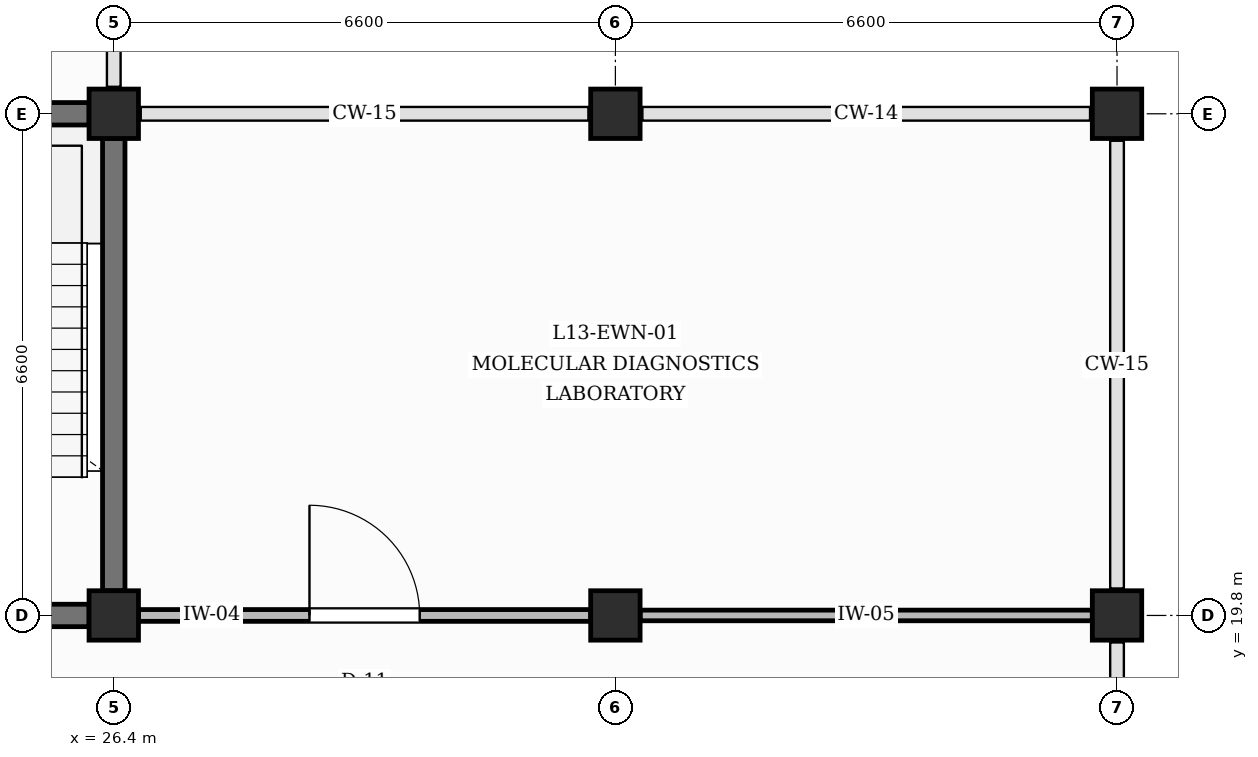
"""IFC4 building model, lengths in metres.
Left out: names, types, materials, properties, quantities, classifications, styles, units other than length and angle.
Written with IfcOpenShell. Run it as: python <this file> out.ifc"""

import sys

from ifc_helpers import new_model, si_unit, direction, frame, frame_2d, origin, origin_2d, place, context, subcontext, project, spatial, rectangle, extrude, element, fill, save


model = new_model("IFC4")
c1 = context("Model", 3, precision=1e-05, world=origin(), true_north=direction((0.0, 1.0)))
c2 = subcontext(c1, "Body", "Model", "MODEL_VIEW")
j1 = project(units=[si_unit("LENGTHUNIT", "METRE"), si_unit("PLANEANGLEUNIT", "RADIAN")], contexts=[c1])
p1 = place(None, origin())
s1 = spatial("IfcSite", under=j1, at=p1, CompositionType="ELEMENT")
p2 = place(p1, origin())
s2 = spatial("IfcBuilding", under=s1, at=p2, CompositionType="ELEMENT")
p3 = place(p2, frame((0.0, 0.0, 56.4)))
s3 = spatial("IfcBuildingStorey", under=s2, at=p3, CompositionType="ELEMENT", Elevation=56.4)
for number, where, z_axis, x_axis in (
    (1, (26.4, 19.8, 0.0), (0.0, 0.0, 1.0), (1.0, 0.0, 0.0)),
    (2, (26.4, 26.4, 0.0), (0.0, 0.0, 1.0), (1.0, 0.0, 0.0)),
    (3, (33.0, 19.8, 0.0), (0.0, 0.0, 1.0), (1.0, 0.0, 0.0)),
    (4, (33.0, 26.4, 0.0), (0.0, 0.0, 1.0), (1.0, 0.0, 0.0)),
    (5, (39.6, 19.8, 0.0), (0.0, 0.0, 1.0), (1.0, 0.0, 0.0)),
    (6, (39.6, 26.4, 0.0), (0.0, 0.0, 1.0), (1.0, 0.0, 0.0)),
):
    element("IfcColumn", number, at=place(p3, frame(where, z_axis=z_axis, x_axis=x_axis)), inside=s3, PredefinedType="COLUMN", context=c2, shape_type="SweptSolid", body=[
        extrude(rectangle(XDim=0.65, YDim=0.65, at=origin_2d()), origin(), (0.0, 0.0, 1.0), 4.2),
    ])
p4 = place(p3, frame((20.125, 19.8, 0.0), z_axis=(0.0, 0.0, 1.0), x_axis=(1.0, 0.0, 0.0)))
e7 = element("IfcWall", 7, at=p4, inside=s3, PredefinedType="SHEAR", context=c2, shape_type="SweptSolid", body=[
    extrude(rectangle(XDim=5.95, YDim=0.295, at=frame_2d((2.975, 0.0))), origin(), (0.0, 0.0, 1.0), 3.3),
])
p5 = place(p4, frame((2.425, 0.0, 0.0)))
e8 = element("IfcOpeningElement", 8, at=p5, cuts=e7, PredefinedType="OPENING", context=c2, shape_type="SweptSolid", body=[
    extrude(rectangle(XDim=1.1, YDim=2.15, at=frame_2d((0.55, 1.075))), frame((0.0, 0.157, 0.0), z_axis=(0.0, -1.0, 0.0), x_axis=(1.0, 0.0, 0.0)), (0.0, 0.0, 1.0), 0.315),
])
for number, where, z_axis, x_axis in (
    (9, (20.125, 26.4, 0.0), (0.0, 0.0, 1.0), (1.0, 0.0, 0.0)),
    (10, (26.4, 20.125, 0.0), (0.0, 0.0, 1.0), (0.0, 1.0, 0.0)),
):
    element("IfcWall", number, at=place(p3, frame(where, z_axis=z_axis, x_axis=x_axis)), inside=s3, PredefinedType="SHEAR", context=c2, shape_type="SweptSolid", body=[
        extrude(rectangle(XDim=5.95, YDim=0.295, at=frame_2d((2.975, 0.0))), origin(), (0.0, 0.0, 1.0), 3.3),
    ])
p6 = place(p3, frame((26.725, 19.8, 0.0), z_axis=(0.0, 0.0, 1.0), x_axis=(1.0, 0.0, 0.0)))
e11 = element("IfcWall", 11, at=p6, inside=s3, PredefinedType="PARTITIONING", context=c2, shape_type="SweptSolid", body=[
    extrude(rectangle(XDim=5.95, YDim=0.155, at=frame_2d((2.975, 0.0))), origin(), (0.0, 0.0, 1.0), 3.3),
])
p7 = place(p6, frame((2.25, 0.0, 0.0)))
e12 = element("IfcOpeningElement", 12, at=p7, cuts=e11, PredefinedType="OPENING", context=c2, shape_type="SweptSolid", body=[
    extrude(rectangle(XDim=1.45, YDim=2.25, at=frame_2d((0.725, 1.125))), frame((0.0, 0.087, 0.0), z_axis=(0.0, -1.0, 0.0), x_axis=(1.0, 0.0, 0.0)), (0.0, 0.0, 1.0), 0.175),
])
p8 = place(p3, frame((33.325, 19.8, 0.0), z_axis=(0.0, 0.0, 1.0), x_axis=(1.0, 0.0, 0.0)))
e13 = element("IfcWall", 13, at=p8, inside=s3, PredefinedType="PARTITIONING", context=c2, shape_type="SweptSolid", body=[
    extrude(rectangle(XDim=5.95, YDim=0.14, at=frame_2d((2.975, 0.0))), origin(), (0.0, 0.0, 1.0), 3.3),
])
p9 = place(p7, origin())
e14 = element("IfcDoor", 14, at=p9, inside=s3, OperationType="SINGLE_SWING_LEFT", PredefinedType="DOOR", context=c2, shape_type="SweptSolid", body=[
    extrude(rectangle(XDim=1.45, YDim=2.25, at=frame_2d((0.725, 1.125))), frame((0.0, 0.025, 0.0), z_axis=(0.0, -1.0, 0.0), x_axis=(1.0, 0.0, 0.0)), (0.0, 0.0, 1.0), 0.05),
])
fill(e12, e14)
save(model, sys.argv[1])
